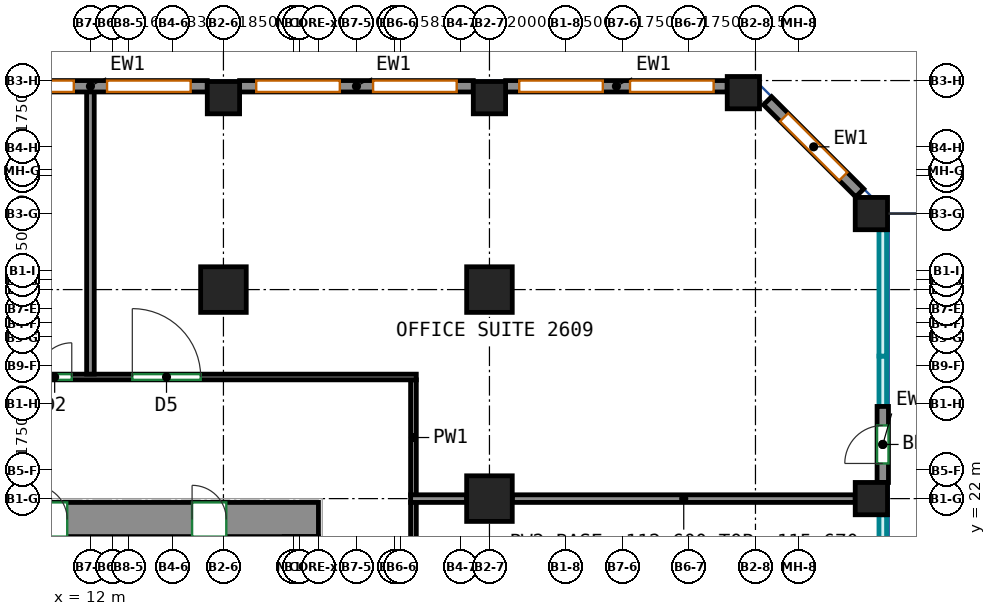
"""IFC4 building model, lengths in metres.
Left out: names, types, materials, properties, quantities, classifications, styles, units other than length and angle.
Written with IfcOpenShell. Run it as: python <this file> out.ifc"""

import sys

from ifc_helpers import new_model, si_unit, direction, frame, frame_2d, origin, origin_2d, place, context, subcontext, project, spatial, rectangle, extrude, source, transform, mapped, element, fill, save


model = new_model("IFC4")
c1 = context("Model", 3, precision=1e-05, world=origin(), true_north=direction((0.0, 1.0)))
c2 = subcontext(c1, "Body", "Model", "MODEL_VIEW")
j1 = project(units=[si_unit("LENGTHUNIT", "METRE"), si_unit("PLANEANGLEUNIT", "RADIAN")], contexts=[c1])
p1 = place(None, origin())
s1 = spatial("IfcSite", under=j1, at=p1, CompositionType="ELEMENT")
p2 = place(p1, origin())
s2 = spatial("IfcBuilding", under=s1, at=p2, CompositionType="ELEMENT")
p3 = place(p2, frame((0.0, 0.0, 112.6)))
s3 = spatial("IfcBuildingStorey", under=s2, at=p3, CompositionType="ELEMENT", Elevation=112.6)
m1 = source(origin(), c2, "Body", "SweptSolid", [
    extrude(rectangle(XDim=1.2, YDim=1.2, at=origin_2d()), origin(), (0.0, 0.0, 1.0), 3.72),
])
p4 = place(p3, frame((15.5, 27.5, 0.0), z_axis=(0.0, 0.0, 1.0), x_axis=(1.0, 0.0, 0.0)))
e1 = element("IfcColumn", 1, at=p4, inside=s3, PredefinedType="COLUMN", context=c2, shape_type="MappedRepresentation", body=[
    mapped(m1, transform((0.0, 0.0, 0.0))),
])
m2 = source(origin(), c2, "Body", "SweptSolid", [
    extrude(rectangle(XDim=0.85, YDim=0.85, at=origin_2d()), origin(), (0.0, 0.0, 1.0), 3.72),
])
p5 = place(p3, frame((15.5, 32.55, 0.0), z_axis=(0.0, 0.0, 1.0), x_axis=(1.0, 0.0, 0.0)))
e2 = element("IfcColumn", 2, at=p5, inside=s3, PredefinedType="COLUMN", context=c2, shape_type="MappedRepresentation", body=[
    mapped(m2, transform((0.0, 0.0, 0.0))),
])
for number, where, z_axis, x_axis in (
    (3, (22.5, 22.0, 0.0), (0.0, 0.0, 1.0), (1.0, 0.0, 0.0)),
    (4, (22.5, 27.5, 0.0), (0.0, 0.0, 1.0), (1.0, 0.0, 0.0)),
):
    element("IfcColumn", number, at=place(p3, frame(where, z_axis=z_axis, x_axis=x_axis)), inside=s3, PredefinedType="COLUMN", context=c2, shape_type="MappedRepresentation", body=[
        mapped(m1, transform((0.0, 0.0, 0.0))),
    ])
for number, where, z_axis, x_axis in (
    (5, (22.5, 32.55, 0.0), (0.0, 0.0, 1.0), (1.0, 0.0, 0.0)),
    (6, (29.182, 32.682, 0.0), (0.0, 0.0, 1.0), (1.0, 0.0, 0.0)),
    (7, (32.55, 22.0, 0.0), (0.0, 0.0, 1.0), (1.0, 0.0, 0.0)),
    (8, (32.55, 29.5, 0.0), (0.0, 0.0, 1.0), (1.0, 0.0, 0.0)),
):
    element("IfcColumn", number, at=place(p3, frame(where, z_axis=z_axis, x_axis=x_axis)), inside=s3, PredefinedType="COLUMN", context=c2, shape_type="MappedRepresentation", body=[
        mapped(m2, transform((0.0, 0.0, 0.0))),
    ])
m3 = source(origin(), c2, "Body", "SweptSolid", [
    extrude(rectangle(XDim=33.9, YDim=0.9, at=frame_2d((16.95, 0.0))), origin(), (0.0, 0.0, 1.0), 3.72),
])
p6 = place(p3, frame((-15.9, 21.45, 0.0), z_axis=(0.0, 0.0, 1.0), x_axis=(1.0, 0.0, 0.0)))
e9 = element("IfcWall", 9, at=p6, inside=s3, PredefinedType="SHEAR", context=c2, shape_type="MappedRepresentation", body=[
    mapped(m3, transform((0.0, 0.0, 0.0))),
])
p7 = place(p6, frame((6.008, 0.0, 0.0)))
e10 = element("IfcOpeningElement", 10, at=p7, cuts=e9, PredefinedType="OPENING", context=c2, shape_type="SweptSolid", body=[
    extrude(rectangle(XDim=0.9, YDim=2.1, at=frame_2d((0.45, 1.05))), frame((0.0, 0.46, 0.0), z_axis=(0.0, -1.0, 0.0), x_axis=(1.0, 0.0, 0.0)), (0.0, 0.0, 1.0), 0.92),
])
p8 = place(p6, frame((8.688, 0.0, 0.0)))
e11 = element("IfcOpeningElement", 11, at=p8, cuts=e9, PredefinedType="OPENING", context=c2, shape_type="SweptSolid", body=[
    extrude(rectangle(XDim=0.9, YDim=2.1, at=frame_2d((0.45, 1.05))), frame((0.0, 0.46, 0.0), z_axis=(0.0, -1.0, 0.0), x_axis=(1.0, 0.0, 0.0)), (0.0, 0.0, 1.0), 0.92),
])
p9 = place(p6, frame((12.185, 0.0, 0.0)))
e12 = element("IfcOpeningElement", 12, at=p9, cuts=e9, PredefinedType="OPENING", context=c2, shape_type="SweptSolid", body=[
    extrude(rectangle(XDim=0.9, YDim=2.1, at=frame_2d((0.45, 1.05))), frame((0.0, 0.46, 0.0), z_axis=(0.0, -1.0, 0.0), x_axis=(1.0, 0.0, 0.0)), (0.0, 0.0, 1.0), 0.92),
])
p10 = place(p6, frame((16.138, 0.0, 0.0)))
e13 = element("IfcOpeningElement", 13, at=p10, cuts=e9, PredefinedType="OPENING", context=c2, shape_type="SweptSolid", body=[
    extrude(rectangle(XDim=0.9, YDim=2.1, at=frame_2d((0.45, 1.05))), frame((0.0, 0.46, 0.0), z_axis=(0.0, -1.0, 0.0), x_axis=(1.0, 0.0, 0.0)), (0.0, 0.0, 1.0), 0.92),
])
p11 = place(p6, frame((20.962, 0.0, 0.0)))
e14 = element("IfcOpeningElement", 14, at=p11, cuts=e9, PredefinedType="OPENING", context=c2, shape_type="SweptSolid", body=[
    extrude(rectangle(XDim=0.9, YDim=2.1, at=frame_2d((0.45, 1.05))), frame((0.0, 0.46, 0.0), z_axis=(0.0, -1.0, 0.0), x_axis=(1.0, 0.0, 0.0)), (0.0, 0.0, 1.0), 0.92),
])
p12 = place(p6, frame((26.389, 0.0, 0.0)))
e15 = element("IfcOpeningElement", 15, at=p12, cuts=e9, PredefinedType="OPENING", context=c2, shape_type="SweptSolid", body=[
    extrude(rectangle(XDim=0.9, YDim=2.1, at=frame_2d((0.45, 1.05))), frame((0.0, 0.46, 0.0), z_axis=(0.0, -1.0, 0.0), x_axis=(1.0, 0.0, 0.0)), (0.0, 0.0, 1.0), 0.92),
])
p13 = place(p6, frame((2.425, 0.0, 0.0)))
e16 = element("IfcOpeningElement", 16, at=p13, cuts=e9, PredefinedType="OPENING", context=c2, shape_type="SweptSolid", body=[
    extrude(rectangle(XDim=0.9, YDim=2.1, at=frame_2d((0.45, 1.05))), frame((0.0, 0.46, 0.0), z_axis=(0.0, -1.0, 0.0), x_axis=(1.0, 0.0, 0.0)), (0.0, 0.0, 1.0), 0.92),
])
p14 = place(p6, frame((30.575, 0.0, 0.0)))
e17 = element("IfcOpeningElement", 17, at=p14, cuts=e9, PredefinedType="OPENING", context=c2, shape_type="SweptSolid", body=[
    extrude(rectangle(XDim=0.9, YDim=2.1, at=frame_2d((0.45, 1.05))), frame((0.0, 0.46, 0.0), z_axis=(0.0, -1.0, 0.0), x_axis=(1.0, 0.0, 0.0)), (0.0, 0.0, 1.0), 0.92),
])
m4 = source(origin(), c2, "Body", "SweptSolid", [
    extrude(rectangle(XDim=2.0, YDim=0.3, at=frame_2d((1.0, 0.0))), origin(), (0.0, 0.0, 1.0), 3.72),
])
p15 = place(p3, frame((32.85, 22.425, 0.0), z_axis=(0.0, 0.0, 1.0), x_axis=(0.0, 1.0, 0.0)))
e18 = element("IfcWall", 18, at=p15, inside=s3, PredefinedType="SOLIDWALL", context=c2, shape_type="MappedRepresentation", body=[
    mapped(m4, transform((0.0, 0.0, 0.0))),
])
p16 = place(p15, frame((0.5, 0.0, 0.0)))
e19 = element("IfcOpeningElement", 19, at=p16, cuts=e18, PredefinedType="OPENING", context=c2, shape_type="SweptSolid", body=[
    extrude(rectangle(XDim=1.0, YDim=2.1, at=frame_2d((0.5, 1.05))), frame((0.0, 0.16, 0.0), z_axis=(0.0, -1.0, 0.0), x_axis=(1.0, 0.0, 0.0)), (0.0, 0.0, 1.0), 0.32),
])
m5 = source(origin(), c2, "Body", "SweptSolid", [
    extrude(rectangle(XDim=3.429, YDim=0.3, at=frame_2d((1.715, 0.0))), origin(), (0.0, 0.0, 1.0), 3.72),
])
p17 = place(p3, frame((32.244, 30.044, 0.0), z_axis=(0.0, 0.0, 1.0), x_axis=(-0.707106781187, 0.707106781187, 0.0)))
e20 = element("IfcWall", 20, at=p17, inside=s3, PredefinedType="SOLIDWALL", context=c2, shape_type="MappedRepresentation", body=[
    mapped(m5, transform((0.0, 0.0, 0.0))),
])
p18 = place(p17, frame((0.615, 0.0, 0.7)))
e21 = element("IfcOpeningElement", 21, at=p18, cuts=e20, PredefinedType="OPENING", context=c2, shape_type="SweptSolid", body=[
    extrude(rectangle(XDim=2.2, YDim=2.25, at=frame_2d((1.1, 1.125))), frame((0.0, 0.16, 0.0), z_axis=(0.0, -1.0, 0.0), x_axis=(1.0, 0.0, 0.0)), (0.0, 0.0, 1.0), 0.32),
])
m6 = source(origin(), c2, "Body", "SweptSolid", [
    extrude(rectangle(XDim=5.832, YDim=0.3, at=frame_2d((2.916, 0.0))), origin(), (0.0, 0.0, 1.0), 3.72),
])
p19 = place(p3, frame((28.757, 32.85, 0.0), z_axis=(0.0, 0.0, 1.0), x_axis=(-1.0, 0.0, 0.0)))
e22 = element("IfcWall", 22, at=p19, inside=s3, PredefinedType="SOLIDWALL", context=c2, shape_type="MappedRepresentation", body=[
    mapped(m6, transform((0.0, 0.0, 0.0))),
])
p20 = place(p19, frame((0.358, 0.0, 0.7)))
e23 = element("IfcOpeningElement", 23, at=p20, cuts=e22, PredefinedType="OPENING", context=c2, shape_type="SweptSolid", body=[
    extrude(rectangle(XDim=2.2, YDim=2.25, at=frame_2d((1.1, 1.125))), frame((0.0, 0.16, 0.0), z_axis=(0.0, -1.0, 0.0), x_axis=(1.0, 0.0, 0.0)), (0.0, 0.0, 1.0), 0.32),
])
p21 = place(p19, frame((3.274, 0.0, 0.7)))
e24 = element("IfcOpeningElement", 24, at=p21, cuts=e22, PredefinedType="OPENING", context=c2, shape_type="SweptSolid", body=[
    extrude(rectangle(XDim=2.2, YDim=2.25, at=frame_2d((1.1, 1.125))), frame((0.0, 0.16, 0.0), z_axis=(0.0, -1.0, 0.0), x_axis=(1.0, 0.0, 0.0)), (0.0, 0.0, 1.0), 0.32),
])
m7 = source(origin(), c2, "Body", "SweptSolid", [
    extrude(rectangle(XDim=6.15, YDim=0.3, at=frame_2d((3.075, 0.0))), origin(), (0.0, 0.0, 1.0), 3.72),
])
p22 = place(p3, frame((22.075, 32.85, 0.0), z_axis=(0.0, 0.0, 1.0), x_axis=(-1.0, 0.0, 0.0)))
e25 = element("IfcWall", 25, at=p22, inside=s3, PredefinedType="SOLIDWALL", context=c2, shape_type="MappedRepresentation", body=[
    mapped(m7, transform((0.0, 0.0, 0.0))),
])
p23 = place(p22, frame((0.438, 0.0, 0.7)))
e26 = element("IfcOpeningElement", 26, at=p23, cuts=e25, PredefinedType="OPENING", context=c2, shape_type="SweptSolid", body=[
    extrude(rectangle(XDim=2.2, YDim=2.25, at=frame_2d((1.1, 1.125))), frame((0.0, 0.16, 0.0), z_axis=(0.0, -1.0, 0.0), x_axis=(1.0, 0.0, 0.0)), (0.0, 0.0, 1.0), 0.32),
])
p24 = place(p22, frame((3.512, 0.0, 0.7)))
e27 = element("IfcOpeningElement", 27, at=p24, cuts=e25, PredefinedType="OPENING", context=c2, shape_type="SweptSolid", body=[
    extrude(rectangle(XDim=2.2, YDim=2.25, at=frame_2d((1.1, 1.125))), frame((0.0, 0.16, 0.0), z_axis=(0.0, -1.0, 0.0), x_axis=(1.0, 0.0, 0.0)), (0.0, 0.0, 1.0), 0.32),
])
p25 = place(p3, frame((15.075, 32.85, 0.0), z_axis=(0.0, 0.0, 1.0), x_axis=(-1.0, 0.0, 0.0)))
e28 = element("IfcWall", 28, at=p25, inside=s3, PredefinedType="SOLIDWALL", context=c2, shape_type="MappedRepresentation", body=[
    mapped(m7, transform((0.0, 0.0, 0.0))),
])
p26 = place(p25, frame((0.438, 0.0, 0.7)))
e29 = element("IfcOpeningElement", 29, at=p26, cuts=e28, PredefinedType="OPENING", context=c2, shape_type="SweptSolid", body=[
    extrude(rectangle(XDim=2.2, YDim=2.25, at=frame_2d((1.1, 1.125))), frame((0.0, 0.16, 0.0), z_axis=(0.0, -1.0, 0.0), x_axis=(1.0, 0.0, 0.0)), (0.0, 0.0, 1.0), 0.32),
])
p27 = place(p25, frame((3.512, 0.0, 0.7)))
e30 = element("IfcOpeningElement", 30, at=p27, cuts=e28, PredefinedType="OPENING", context=c2, shape_type="SweptSolid", body=[
    extrude(rectangle(XDim=2.2, YDim=2.25, at=frame_2d((1.1, 1.125))), frame((0.0, 0.16, 0.0), z_axis=(0.0, -1.0, 0.0), x_axis=(1.0, 0.0, 0.0)), (0.0, 0.0, 1.0), 0.32),
])
p28 = place(p3, frame((20.5, 17.75, 0.0), z_axis=(0.0, 0.0, 1.0), x_axis=(0.0, 1.0, 0.0)))
e31 = element("IfcWall", 31, at=p28, inside=s3, PredefinedType="PARTITIONING", context=c2, shape_type="SweptSolid", body=[
    extrude(rectangle(XDim=4.16, YDim=0.15, at=frame_2d((2.08, 0.0))), origin(), (0.0, 0.0, 1.0), 3.72),
])
p29 = place(p3, frame((20.5, 22.09, 0.0), z_axis=(0.0, 0.0, 1.0), x_axis=(0.0, 1.0, 0.0)))
e32 = element("IfcWall", 32, at=p29, inside=s3, PredefinedType="PARTITIONING", context=c2, shape_type="SweptSolid", body=[
    extrude(rectangle(XDim=3.035, YDim=0.15, at=frame_2d((1.518, 0.0))), origin(), (0.0, 0.0, 1.0), 3.72),
])
p30 = place(p3, frame((-19.6, 25.2, 0.0), z_axis=(0.0, 0.0, 1.0), x_axis=(1.0, 0.0, 0.0)))
e33 = element("IfcWall", 33, at=p30, inside=s3, PredefinedType="PARTITIONING", context=c2, shape_type="SweptSolid", body=[
    extrude(rectangle(XDim=40.175, YDim=0.15, at=frame_2d((20.087, 0.0))), origin(), (0.0, 0.0, 1.0), 3.72),
])
p31 = place(p30, frame((1.104, 0.0, 0.0)))
e34 = element("IfcOpeningElement", 34, at=p31, cuts=e33, PredefinedType="OPENING", context=c2, shape_type="SweptSolid", body=[
    extrude(rectangle(XDim=0.9, YDim=2.1, at=frame_2d((0.45, 1.05))), frame((0.0, 0.085, 0.0), z_axis=(0.0, -1.0, 0.0), x_axis=(1.0, 0.0, 0.0)), (0.0, 0.0, 1.0), 0.17),
])
p32 = place(p30, frame((5.296, 0.0, 0.0)))
e35 = element("IfcOpeningElement", 35, at=p32, cuts=e33, PredefinedType="OPENING", context=c2, shape_type="SweptSolid", body=[
    extrude(rectangle(XDim=0.9, YDim=2.1, at=frame_2d((0.45, 1.05))), frame((0.0, 0.085, 0.0), z_axis=(0.0, -1.0, 0.0), x_axis=(1.0, 0.0, 0.0)), (0.0, 0.0, 1.0), 0.17),
])
p33 = place(p30, frame((18.302, 0.0, 0.0)))
e36 = element("IfcOpeningElement", 36, at=p33, cuts=e33, PredefinedType="OPENING", context=c2, shape_type="SweptSolid", body=[
    extrude(rectangle(XDim=1.0, YDim=2.1, at=frame_2d((0.5, 1.05))), frame((0.0, 0.085, 0.0), z_axis=(0.0, -1.0, 0.0), x_axis=(1.0, 0.0, 0.0)), (0.0, 0.0, 1.0), 0.17),
])
p34 = place(p30, frame((30.209, 0.0, 0.0)))
e37 = element("IfcOpeningElement", 37, at=p34, cuts=e33, PredefinedType="OPENING", context=c2, shape_type="SweptSolid", body=[
    extrude(rectangle(XDim=0.9, YDim=2.1, at=frame_2d((0.45, 1.05))), frame((0.0, 0.085, 0.0), z_axis=(0.0, -1.0, 0.0), x_axis=(1.0, 0.0, 0.0)), (0.0, 0.0, 1.0), 0.17),
])
p35 = place(p30, frame((32.702, 0.0, 0.0)))
e38 = element("IfcOpeningElement", 38, at=p35, cuts=e33, PredefinedType="OPENING", context=c2, shape_type="SweptSolid", body=[
    extrude(rectangle(XDim=1.8, YDim=2.1, at=frame_2d((0.9, 1.05))), frame((0.0, 0.085, 0.0), z_axis=(0.0, -1.0, 0.0), x_axis=(1.0, 0.0, 0.0)), (0.0, 0.0, 1.0), 0.17),
])
p36 = place(p3, frame((20.426, 22.0, 0.0), z_axis=(0.0, 0.0, 1.0), x_axis=(1.0, 0.0, 0.0)))
e39 = element("IfcWall", 39, at=p36, inside=s3, PredefinedType="PARTITIONING", context=c2, shape_type="SweptSolid", body=[
    extrude(rectangle(XDim=1.474, YDim=0.2, at=frame_2d((0.737, 0.0))), origin(), (0.0, 0.0, 1.0), 3.72),
])
p37 = place(p3, frame((23.1, 22.0, 0.0), z_axis=(0.0, 0.0, 1.0), x_axis=(1.0, 0.0, 0.0)))
e40 = element("IfcWall", 40, at=p37, inside=s3, PredefinedType="PARTITIONING", context=c2, shape_type="SweptSolid", body=[
    extrude(rectangle(XDim=9.025, YDim=0.2, at=frame_2d((4.512, 0.0))), origin(), (0.0, 0.0, 1.0), 3.07),
])
p38 = place(p3, frame((12.0, 25.276, 0.0), z_axis=(0.0, 0.0, 1.0), x_axis=(0.0, 1.0, 0.0)))
e41 = element("IfcWall", 41, at=p38, inside=s3, PredefinedType="PARTITIONING", context=c2, shape_type="SweptSolid", body=[
    extrude(rectangle(XDim=7.474, YDim=0.2, at=frame_2d((3.737, 0.0))), origin(), (0.0, 0.0, 1.0), 3.72),
])
p39 = place(p16, origin())
e42 = element("IfcDoor", 42, at=p39, inside=s3, OperationType="SINGLE_SWING_LEFT", PredefinedType="DOOR", context=c2, shape_type="SweptSolid", body=[
    extrude(rectangle(XDim=1.0, YDim=2.1, at=frame_2d((0.5, 1.05))), frame((0.0, 0.025, 0.0), z_axis=(0.0, -1.0, 0.0), x_axis=(1.0, 0.0, 0.0)), (0.0, 0.0, 1.0), 0.05),
])
fill(e19, e42)
p40 = place(p18, origin())
e43 = element("IfcWindow", 43, at=p40, inside=s3, PartitioningType="SINGLE_PANEL", PredefinedType="WINDOW", context=c2, shape_type="SweptSolid", body=[
    extrude(rectangle(XDim=2.2, YDim=2.25, at=frame_2d((1.1, 1.125))), frame((0.0, 0.03, 0.0), z_axis=(0.0, -1.0, 0.0), x_axis=(1.0, 0.0, 0.0)), (0.0, 0.0, 1.0), 0.06),
])
fill(e21, e43)
p41 = place(p20, origin())
e44 = element("IfcWindow", 44, at=p41, inside=s3, PartitioningType="SINGLE_PANEL", PredefinedType="WINDOW", context=c2, shape_type="SweptSolid", body=[
    extrude(rectangle(XDim=2.2, YDim=2.25, at=frame_2d((1.1, 1.125))), frame((0.0, 0.03, 0.0), z_axis=(0.0, -1.0, 0.0), x_axis=(1.0, 0.0, 0.0)), (0.0, 0.0, 1.0), 0.06),
])
fill(e23, e44)
p42 = place(p21, origin())
e45 = element("IfcWindow", 45, at=p42, inside=s3, PartitioningType="SINGLE_PANEL", PredefinedType="WINDOW", context=c2, shape_type="SweptSolid", body=[
    extrude(rectangle(XDim=2.2, YDim=2.25, at=frame_2d((1.1, 1.125))), frame((0.0, 0.03, 0.0), z_axis=(0.0, -1.0, 0.0), x_axis=(1.0, 0.0, 0.0)), (0.0, 0.0, 1.0), 0.06),
])
fill(e24, e45)
p43 = place(p23, origin())
e46 = element("IfcWindow", 46, at=p43, inside=s3, PartitioningType="SINGLE_PANEL", PredefinedType="WINDOW", context=c2, shape_type="SweptSolid", body=[
    extrude(rectangle(XDim=2.2, YDim=2.25, at=frame_2d((1.1, 1.125))), frame((0.0, 0.03, 0.0), z_axis=(0.0, -1.0, 0.0), x_axis=(1.0, 0.0, 0.0)), (0.0, 0.0, 1.0), 0.06),
])
fill(e26, e46)
p44 = place(p24, origin())
e47 = element("IfcWindow", 47, at=p44, inside=s3, PartitioningType="SINGLE_PANEL", PredefinedType="WINDOW", context=c2, shape_type="SweptSolid", body=[
    extrude(rectangle(XDim=2.2, YDim=2.25, at=frame_2d((1.1, 1.125))), frame((0.0, 0.03, 0.0), z_axis=(0.0, -1.0, 0.0), x_axis=(1.0, 0.0, 0.0)), (0.0, 0.0, 1.0), 0.06),
])
fill(e27, e47)
p45 = place(p26, origin())
e48 = element("IfcWindow", 48, at=p45, inside=s3, PartitioningType="SINGLE_PANEL", PredefinedType="WINDOW", context=c2, shape_type="SweptSolid", body=[
    extrude(rectangle(XDim=2.2, YDim=2.25, at=frame_2d((1.1, 1.125))), frame((0.0, 0.03, 0.0), z_axis=(0.0, -1.0, 0.0), x_axis=(1.0, 0.0, 0.0)), (0.0, 0.0, 1.0), 0.06),
])
fill(e29, e48)
p46 = place(p27, origin())
e49 = element("IfcWindow", 49, at=p46, inside=s3, PartitioningType="SINGLE_PANEL", PredefinedType="WINDOW", context=c2, shape_type="SweptSolid", body=[
    extrude(rectangle(XDim=2.2, YDim=2.25, at=frame_2d((1.1, 1.125))), frame((0.0, 0.03, 0.0), z_axis=(0.0, -1.0, 0.0), x_axis=(1.0, 0.0, 0.0)), (0.0, 0.0, 1.0), 0.06),
])
fill(e30, e49)
p47 = place(p12, origin())
e50 = element("IfcDoor", 50, at=p47, inside=s3, OperationType="SINGLE_SWING_LEFT", PredefinedType="DOOR", context=c2, shape_type="SweptSolid", body=[
    extrude(rectangle(XDim=0.9, YDim=2.1, at=frame_2d((0.45, 1.05))), frame((0.0, -0.305, 0.0), z_axis=(0.0, -1.0, 0.0), x_axis=(1.0, 0.0, 0.0)), (0.0, 0.0, 1.0), 0.05),
])
fill(e15, e50)
p48 = place(p14, origin())
e51 = element("IfcDoor", 51, at=p48, inside=s3, OperationType="SINGLE_SWING_LEFT", PredefinedType="DOOR", context=c2, shape_type="SweptSolid", body=[
    extrude(rectangle(XDim=0.9, YDim=2.1, at=frame_2d((0.45, 1.05))), frame((0.0, -0.305, 0.0), z_axis=(0.0, -1.0, 0.0), x_axis=(1.0, 0.0, 0.0)), (0.0, 0.0, 1.0), 0.05),
])
fill(e17, e51)
p49 = place(p34, origin())
e52 = element("IfcDoor", 52, at=p49, inside=s3, OperationType="SINGLE_SWING_RIGHT", PredefinedType="DOOR", context=c2, shape_type="SweptSolid", body=[
    extrude(rectangle(XDim=0.9, YDim=2.1, at=frame_2d((0.45, 1.05))), frame((0.0, 0.025, 0.0), z_axis=(0.0, -1.0, 0.0), x_axis=(1.0, 0.0, 0.0)), (0.0, 0.0, 1.0), 0.05),
])
fill(e37, e52)
p50 = place(p35, origin())
e53 = element("IfcDoor", 53, at=p50, inside=s3, OperationType="DOUBLE_DOOR_SINGLE_SWING", PredefinedType="DOOR", context=c2, shape_type="SweptSolid", body=[
    extrude(rectangle(XDim=1.8, YDim=2.1, at=frame_2d((0.9, 1.05))), frame((0.0, 0.025, 0.0), z_axis=(0.0, -1.0, 0.0), x_axis=(1.0, 0.0, 0.0)), (0.0, 0.0, 1.0), 0.05),
])
fill(e38, e53)
save(model, sys.argv[1])
